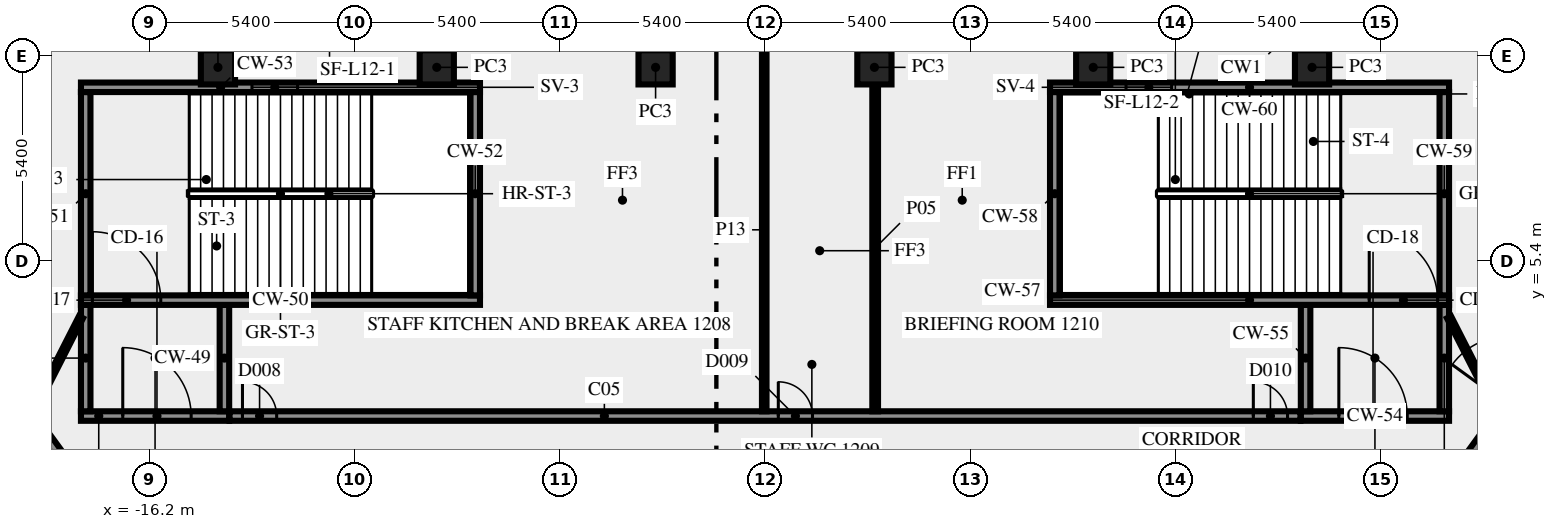
"""IFC4 building model, lengths in metres.
Left out: names, types, materials, properties, quantities, classifications, styles, units other than length and angle.
Written with IfcOpenShell. Run it as: python <this file> out.ifc"""

import sys

from ifc_helpers import new_model, si_unit, direction, frame, frame_2d, origin, origin_2d, place, context, subcontext, project, spatial, rectangle, extrude, element, fill, save


model = new_model("IFC4")
c1 = context("Model", 3, precision=1e-05, world=origin(), true_north=direction((0.0, 1.0)))
c2 = subcontext(c1, "Body", "Model", "MODEL_VIEW")
j1 = project(units=[si_unit("LENGTHUNIT", "METRE"), si_unit("PLANEANGLEUNIT", "RADIAN")], contexts=[c1])
p1 = place(None, origin())
s1 = spatial("IfcSite", under=j1, at=p1, CompositionType="ELEMENT")
p2 = place(p1, origin())
s2 = spatial("IfcBuilding", under=s1, at=p2, CompositionType="ELEMENT")
p3 = place(p2, frame((0.0, 0.0, 55.0)))
s3 = spatial("IfcBuildingStorey", under=s2, at=p3, CompositionType="ELEMENT", Elevation=55.0)
for number, where, z_axis, x_axis in (
    (1, (14.395, 10.5, 0.0), (0.0, 0.0, 1.0), (-1.0, 0.0, 0.0)),
    (2, (8.637, 10.5, 0.0), (0.0, 0.0, 1.0), (-1.0, 0.0, 0.0)),
    (3, (2.879, 10.5, 0.0), (0.0, 0.0, 1.0), (-1.0, 0.0, 0.0)),
    (4, (-2.879, 10.5, 0.0), (0.0, 0.0, 1.0), (-1.0, 0.0, 0.0)),
    (5, (-8.637, 10.5, 0.0), (0.0, 0.0, 1.0), (-1.0, 0.0, 0.0)),
    (6, (-14.395, 10.5, 0.0), (0.0, 0.0, 1.0), (-1.0, 0.0, 0.0)),
):
    element("IfcColumn", number, at=place(p3, frame(where, z_axis=z_axis, x_axis=x_axis)), inside=s3, PredefinedType="COLUMN", context=c2, shape_type="SweptSolid", body=[
        extrude(rectangle(XDim=0.9, YDim=0.9, at=origin_2d()), origin(), (0.0, 0.0, 1.0), 3.65),
    ])
p4 = place(p3, frame((-18.0, 1.325, 0.0), z_axis=(0.0, 0.0, 1.0), x_axis=(1.0, 0.0, 0.0)))
e7 = element("IfcWall", 7, at=p4, inside=s3, PredefinedType="SHEAR", context=c2, shape_type="SweptSolid", body=[
    extrude(rectangle(XDim=3.9, YDim=0.25, at=frame_2d((1.95, 0.0))), origin(), (0.0, 0.0, 1.0), 3.65),
])
p5 = place(p4, frame((1.1, 0.0, 0.0)))
e8 = element("IfcOpeningElement", 8, at=p5, cuts=e7, PredefinedType="OPENING", context=c2, shape_type="SweptSolid", body=[
    extrude(rectangle(XDim=1.8, YDim=2.1, at=frame_2d((0.9, 1.05))), frame((0.0, 0.135, 0.0), z_axis=(0.0, -1.0, 0.0), x_axis=(1.0, 0.0, 0.0)), (0.0, 0.0, 1.0), 0.27),
])
for number, where, z_axis, x_axis in (
    (9, (-17.875, 1.45, 0.0), (0.0, 0.0, 1.0), (0.0, 1.0, 0.0)),
    (10, (-14.225, 1.45, 0.0), (0.0, 0.0, 1.0), (0.0, 1.0, 0.0)),
):
    element("IfcWall", number, at=place(p3, frame(where, z_axis=z_axis, x_axis=x_axis)), inside=s3, PredefinedType="SHEAR", context=c2, shape_type="SweptSolid", body=[
        extrude(rectangle(XDim=2.8, YDim=0.25, at=frame_2d((1.4, 0.0))), origin(), (0.0, 0.0, 1.0), 3.65),
    ])
p6 = place(p3, frame((-18.0, 4.375, 0.0), z_axis=(0.0, 0.0, 1.0), x_axis=(1.0, 0.0, 0.0)))
e11 = element("IfcWall", 11, at=p6, inside=s3, PredefinedType="SHEAR", context=c2, shape_type="SweptSolid", body=[
    extrude(rectangle(XDim=10.5, YDim=0.25, at=frame_2d((5.25, 0.0))), origin(), (0.0, 0.0, 1.0), 3.65),
])
p7 = place(p6, frame((0.3, 0.0, 0.0)))
e12 = element("IfcOpeningElement", 12, at=p7, cuts=e11, PredefinedType="OPENING", context=c2, shape_type="SweptSolid", body=[
    extrude(rectangle(XDim=1.8, YDim=2.1, at=frame_2d((0.9, 1.05))), frame((0.0, 0.135, 0.0), z_axis=(0.0, -1.0, 0.0), x_axis=(1.0, 0.0, 0.0)), (0.0, 0.0, 1.0), 0.27),
])
for number, where, z_axis, x_axis in (
    (13, (-17.875, 4.5, 0.0), (0.0, 0.0, 1.0), (0.0, 1.0, 0.0)),
    (14, (-7.625, 4.5, 0.0), (0.0, 0.0, 1.0), (0.0, 1.0, 0.0)),
):
    element("IfcWall", number, at=place(p3, frame(where, z_axis=z_axis, x_axis=x_axis)), inside=s3, PredefinedType="SHEAR", context=c2, shape_type="SweptSolid", body=[
        extrude(rectangle(XDim=5.35, YDim=0.25, at=frame_2d((2.675, 0.0))), origin(), (0.0, 0.0, 1.0), 3.65),
    ])
p8 = place(p3, frame((-18.0, 9.975, 0.0), z_axis=(0.0, 0.0, 1.0), x_axis=(1.0, 0.0, 0.0)))
e15 = element("IfcWall", 15, at=p8, inside=s3, PredefinedType="SHEAR", context=c2, shape_type="SweptSolid", body=[
    extrude(rectangle(XDim=10.5, YDim=0.25, at=frame_2d((5.25, 0.0))), origin(), (0.0, 0.0, 1.0), 3.65),
])
p9 = place(p8, frame((4.5, 0.0, 1.0)))
e16 = element("IfcOpeningElement", 16, at=p9, cuts=e15, PredefinedType="OPENING", context=c2, shape_type="SweptSolid", body=[
    extrude(rectangle(XDim=1.2, YDim=1.2, at=frame_2d((0.6, 0.6))), frame((0.0, 0.135, 0.0), z_axis=(0.0, -1.0, 0.0), x_axis=(1.0, 0.0, 0.0)), (0.0, 0.0, 1.0), 0.27),
])
p10 = place(p3, frame((14.1, 1.325, 0.0), z_axis=(0.0, 0.0, 1.0), x_axis=(1.0, 0.0, 0.0)))
e17 = element("IfcWall", 17, at=p10, inside=s3, PredefinedType="SHEAR", context=c2, shape_type="SweptSolid", body=[
    extrude(rectangle(XDim=3.9, YDim=0.25, at=frame_2d((1.95, 0.0))), origin(), (0.0, 0.0, 1.0), 3.65),
])
p11 = place(p10, frame((1.0, 0.0, 0.0)))
e18 = element("IfcOpeningElement", 18, at=p11, cuts=e17, PredefinedType="OPENING", context=c2, shape_type="SweptSolid", body=[
    extrude(rectangle(XDim=1.8, YDim=2.1, at=frame_2d((0.9, 1.05))), frame((0.0, 0.135, 0.0), z_axis=(0.0, -1.0, 0.0), x_axis=(1.0, 0.0, 0.0)), (0.0, 0.0, 1.0), 0.27),
])
for number, where, z_axis, x_axis in (
    (19, (14.225, 1.45, 0.0), (0.0, 0.0, 1.0), (0.0, 1.0, 0.0)),
    (20, (17.875, 1.45, 0.0), (0.0, 0.0, 1.0), (0.0, 1.0, 0.0)),
):
    element("IfcWall", number, at=place(p3, frame(where, z_axis=z_axis, x_axis=x_axis)), inside=s3, PredefinedType="SHEAR", context=c2, shape_type="SweptSolid", body=[
        extrude(rectangle(XDim=2.8, YDim=0.25, at=frame_2d((1.4, 0.0))), origin(), (0.0, 0.0, 1.0), 3.65),
    ])
p12 = place(p3, frame((7.5, 4.375, 0.0), z_axis=(0.0, 0.0, 1.0), x_axis=(1.0, 0.0, 0.0)))
e21 = element("IfcWall", 21, at=p12, inside=s3, PredefinedType="SHEAR", context=c2, shape_type="SweptSolid", body=[
    extrude(rectangle(XDim=10.5, YDim=0.25, at=frame_2d((5.25, 0.0))), origin(), (0.0, 0.0, 1.0), 3.65),
])
p13 = place(p12, frame((8.4, 0.0, 0.0)))
e22 = element("IfcOpeningElement", 22, at=p13, cuts=e21, PredefinedType="OPENING", context=c2, shape_type="SweptSolid", body=[
    extrude(rectangle(XDim=1.8, YDim=2.1, at=frame_2d((0.9, 1.05))), frame((0.0, 0.135, 0.0), z_axis=(0.0, -1.0, 0.0), x_axis=(1.0, 0.0, 0.0)), (0.0, 0.0, 1.0), 0.27),
])
for number, where, z_axis, x_axis in (
    (23, (7.625, 4.5, 0.0), (0.0, 0.0, 1.0), (0.0, 1.0, 0.0)),
    (24, (17.875, 4.5, 0.0), (0.0, 0.0, 1.0), (0.0, 1.0, 0.0)),
):
    element("IfcWall", number, at=place(p3, frame(where, z_axis=z_axis, x_axis=x_axis)), inside=s3, PredefinedType="SHEAR", context=c2, shape_type="SweptSolid", body=[
        extrude(rectangle(XDim=5.35, YDim=0.25, at=frame_2d((2.675, 0.0))), origin(), (0.0, 0.0, 1.0), 3.65),
    ])
p14 = place(p3, frame((7.5, 9.975, 0.0), z_axis=(0.0, 0.0, 1.0), x_axis=(1.0, 0.0, 0.0)))
e25 = element("IfcWall", 25, at=p14, inside=s3, PredefinedType="SHEAR", context=c2, shape_type="SweptSolid", body=[
    extrude(rectangle(XDim=10.5, YDim=0.25, at=frame_2d((5.25, 0.0))), origin(), (0.0, 0.0, 1.0), 3.65),
])
p15 = place(p14, frame((2.0, 0.0, 1.0)))
e26 = element("IfcOpeningElement", 26, at=p15, cuts=e25, PredefinedType="OPENING", context=c2, shape_type="SweptSolid", body=[
    extrude(rectangle(XDim=1.2, YDim=1.2, at=frame_2d((0.6, 0.6))), frame((0.0, 0.135, 0.0), z_axis=(0.0, -1.0, 0.0), x_axis=(1.0, 0.0, 0.0)), (0.0, 0.0, 1.0), 0.27),
])
p16 = place(p3, frame((-37.232, 25.972, 0.0), z_axis=(0.0, 0.0, 1.0), x_axis=(0.587786323093, -0.809016216391, 0.0)))
e27 = element("IfcWall", 27, at=p16, inside=s3, PredefinedType="SOLIDWALL", context=c2, shape_type="SweptSolid", body=[
    extrude(rectangle(XDim=33.493, YDim=0.25, at=frame_2d((16.747, 0.0))), origin(), (0.0, 0.0, 1.0), 3.65),
])
p17 = place(p16, frame((28.301, 0.0, 0.0)))
e28 = element("IfcOpeningElement", 28, at=p17, cuts=e27, PredefinedType="OPENING", context=c2, shape_type="SweptSolid", body=[
    extrude(rectangle(XDim=1.8, YDim=2.1, at=frame_2d((0.9, 1.05))), frame((0.0, 0.135, 0.0), z_axis=(0.0, -1.0, 0.0), x_axis=(1.0, 0.0, 0.0)), (0.0, 0.0, 1.0), 0.27),
])
p18 = place(p16, frame((4.235, 0.0, 0.0)))
e29 = element("IfcOpeningElement", 29, at=p18, cuts=e27, PredefinedType="OPENING", context=c2, shape_type="SweptSolid", body=[
    extrude(rectangle(XDim=1.8, YDim=2.1, at=frame_2d((0.9, 1.05))), frame((0.0, 0.135, 0.0), z_axis=(0.0, -1.0, 0.0), x_axis=(1.0, 0.0, 0.0)), (0.0, 0.0, 1.0), 0.27),
])
p19 = place(p16, frame((2.685, 0.0, 0.0)))
e30 = element("IfcOpeningElement", 30, at=p19, cuts=e27, PredefinedType="OPENING", context=c2, shape_type="SweptSolid", body=[
    extrude(rectangle(XDim=0.9, YDim=2.1, at=frame_2d((0.45, 1.05))), frame((0.0, 0.135, 0.0), z_axis=(0.0, -1.0, 0.0), x_axis=(1.0, 0.0, 0.0)), (0.0, 0.0, 1.0), 0.27),
])
p20 = place(p3, frame((-14.09, 1.325, 0.0), z_axis=(0.0, 0.0, 1.0), x_axis=(1.0, 0.0, 0.0)))
e31 = element("IfcWall", 31, at=p20, inside=s3, PredefinedType="SOLIDWALL", context=c2, shape_type="SweptSolid", body=[
    extrude(rectangle(XDim=28.18, YDim=0.25, at=frame_2d((14.09, 0.0))), origin(), (0.0, 0.0, 1.0), 3.65),
])
p21 = place(p20, frame((26.94, 0.0, 0.0)))
e32 = element("IfcOpeningElement", 32, at=p21, cuts=e31, PredefinedType="OPENING", context=c2, shape_type="SweptSolid", body=[
    extrude(rectangle(XDim=0.9, YDim=2.1, at=frame_2d((0.45, 1.05))), frame((0.0, 0.135, 0.0), z_axis=(0.0, -1.0, 0.0), x_axis=(1.0, 0.0, 0.0)), (0.0, 0.0, 1.0), 0.27),
])
p22 = place(p20, frame((0.34, 0.0, 0.0)))
e33 = element("IfcOpeningElement", 33, at=p22, cuts=e31, PredefinedType="OPENING", context=c2, shape_type="SweptSolid", body=[
    extrude(rectangle(XDim=0.9, YDim=2.1, at=frame_2d((0.45, 1.05))), frame((0.0, 0.135, 0.0), z_axis=(0.0, -1.0, 0.0), x_axis=(1.0, 0.0, 0.0)), (0.0, 0.0, 1.0), 0.27),
])
p23 = place(p20, frame((14.44, 0.0, 0.0)))
e34 = element("IfcOpeningElement", 34, at=p23, cuts=e31, PredefinedType="OPENING", context=c2, shape_type="SweptSolid", body=[
    extrude(rectangle(XDim=0.9, YDim=2.1, at=frame_2d((0.45, 1.05))), frame((0.0, 0.135, 0.0), z_axis=(0.0, -1.0, 0.0), x_axis=(1.0, 0.0, 0.0)), (0.0, 0.0, 1.0), 0.27),
])
p24 = place(p3, frame((17.545, -1.125, 0.0), z_axis=(0.0, 0.0, 1.0), x_axis=(0.587786323093, 0.809016216391, 0.0)))
e35 = element("IfcWall", 35, at=p24, inside=s3, PredefinedType="SOLIDWALL", context=c2, shape_type="SweptSolid", body=[
    extrude(rectangle(XDim=33.493, YDim=0.25, at=frame_2d((16.747, 0.0))), origin(), (0.0, 0.0, 1.0), 3.65),
])
p25 = place(p24, frame((31.403, 0.0, 0.0)))
e36 = element("IfcOpeningElement", 36, at=p25, cuts=e35, PredefinedType="OPENING", context=c2, shape_type="SweptSolid", body=[
    extrude(rectangle(XDim=1.8, YDim=2.1, at=frame_2d((0.9, 1.05))), frame((0.0, 0.135, 0.0), z_axis=(0.0, -1.0, 0.0), x_axis=(1.0, 0.0, 0.0)), (0.0, 0.0, 1.0), 0.27),
])
p26 = place(p24, frame((3.392, 0.0, 0.0)))
e37 = element("IfcOpeningElement", 37, at=p26, cuts=e35, PredefinedType="OPENING", context=c2, shape_type="SweptSolid", body=[
    extrude(rectangle(XDim=1.8, YDim=2.1, at=frame_2d((0.9, 1.05))), frame((0.0, 0.135, 0.0), z_axis=(0.0, -1.0, 0.0), x_axis=(1.0, 0.0, 0.0)), (0.0, 0.0, 1.0), 0.27),
])
p27 = place(p3, frame((2.899, 10.045, 0.0), z_axis=(0.0, 0.0, 1.0), x_axis=(0.0, -1.0, 0.0)))
e38 = element("IfcWall", 38, at=p27, inside=s3, PredefinedType="PARTITIONING", context=c2, shape_type="SweptSolid", body=[
    extrude(rectangle(XDim=8.595, YDim=0.15, at=frame_2d((4.297, 0.0))), origin(), (0.0, 0.0, 1.0), 3.65),
])
p28 = place(p3, frame((-0.02, 1.45, 0.0), z_axis=(0.0, 0.0, 1.0), x_axis=(0.0, 1.0, 0.0)))
e39 = element("IfcWall", 39, at=p28, inside=s3, PredefinedType="PARTITIONING", context=c2, shape_type="SweptSolid", body=[
    extrude(rectangle(XDim=9.55, YDim=0.12, at=frame_2d((4.775, 0.0))), origin(), (0.0, 0.0, 1.0), 2.75),
])
for number, where, z_axis, x_axis in (
    (40, (18.0, 3.925, 0.0), (0.0, 0.0, 1.0), (0.454, -0.891, 0.0)),
    (41, (-19.261, 1.45, 0.0), (0.0, 0.0, 1.0), (0.454, 0.891, 0.0)),
):
    element("IfcWall", number, at=place(p3, frame(where, z_axis=z_axis, x_axis=x_axis)), inside=s3, PredefinedType="PARTITIONING", context=c2, shape_type="SweptSolid", body=[
        extrude(rectangle(XDim=2.778, YDim=0.12, at=frame_2d((1.389, 0.0))), origin(), (0.0, 0.0, 1.0), 3.65),
    ])
p29 = place(p5, origin())
e42 = element("IfcDoor", 42, at=p29, inside=s3, OperationType="DOUBLE_DOOR_SINGLE_SWING", PredefinedType="DOOR", context=c2, shape_type="SweptSolid", body=[
    extrude(rectangle(XDim=1.8, YDim=2.1, at=frame_2d((0.9, 1.05))), frame((0.0, 0.025, 0.0), z_axis=(0.0, -1.0, 0.0), x_axis=(1.0, 0.0, 0.0)), (0.0, 0.0, 1.0), 0.05),
])
fill(e8, e42)
p30 = place(p7, origin())
e43 = element("IfcDoor", 43, at=p30, inside=s3, OperationType="DOUBLE_DOOR_SINGLE_SWING", PredefinedType="DOOR", context=c2, shape_type="SweptSolid", body=[
    extrude(rectangle(XDim=1.8, YDim=2.1, at=frame_2d((0.9, 1.05))), frame((0.0, 0.025, 0.0), z_axis=(0.0, -1.0, 0.0), x_axis=(1.0, 0.0, 0.0)), (0.0, 0.0, 1.0), 0.05),
])
fill(e12, e43)
p31 = place(p9, origin())
e44 = element("IfcWindow", 44, at=p31, inside=s3, PartitioningType="SINGLE_PANEL", PredefinedType="WINDOW", context=c2, shape_type="SweptSolid", body=[
    extrude(rectangle(XDim=1.2, YDim=1.2, at=frame_2d((0.6, 0.6))), frame((0.0, 0.03, 0.0), z_axis=(0.0, -1.0, 0.0), x_axis=(1.0, 0.0, 0.0)), (0.0, 0.0, 1.0), 0.06),
])
fill(e16, e44)
p32 = place(p11, origin())
e45 = element("IfcDoor", 45, at=p32, inside=s3, OperationType="DOUBLE_DOOR_SINGLE_SWING", PredefinedType="DOOR", context=c2, shape_type="SweptSolid", body=[
    extrude(rectangle(XDim=1.8, YDim=2.1, at=frame_2d((0.9, 1.05))), frame((0.0, 0.025, 0.0), z_axis=(0.0, -1.0, 0.0), x_axis=(1.0, 0.0, 0.0)), (0.0, 0.0, 1.0), 0.05),
])
fill(e18, e45)
p33 = place(p13, origin())
e46 = element("IfcDoor", 46, at=p33, inside=s3, OperationType="DOUBLE_DOOR_SINGLE_SWING", PredefinedType="DOOR", context=c2, shape_type="SweptSolid", body=[
    extrude(rectangle(XDim=1.8, YDim=2.1, at=frame_2d((0.9, 1.05))), frame((0.0, 0.025, 0.0), z_axis=(0.0, -1.0, 0.0), x_axis=(1.0, 0.0, 0.0)), (0.0, 0.0, 1.0), 0.05),
])
fill(e22, e46)
p34 = place(p15, origin())
e47 = element("IfcWindow", 47, at=p34, inside=s3, PartitioningType="SINGLE_PANEL", PredefinedType="WINDOW", context=c2, shape_type="SweptSolid", body=[
    extrude(rectangle(XDim=1.2, YDim=1.2, at=frame_2d((0.6, 0.6))), frame((0.0, 0.03, 0.0), z_axis=(0.0, -1.0, 0.0), x_axis=(1.0, 0.0, 0.0)), (0.0, 0.0, 1.0), 0.06),
])
fill(e26, e47)
p35 = place(p21, origin())
e48 = element("IfcDoor", 48, at=p35, inside=s3, OperationType="SINGLE_SWING_RIGHT", PredefinedType="DOOR", context=c2, shape_type="SweptSolid", body=[
    extrude(rectangle(XDim=0.9, YDim=2.1, at=frame_2d((0.45, 1.05))), frame((0.0, 0.025, 0.0), z_axis=(0.0, -1.0, 0.0), x_axis=(1.0, 0.0, 0.0)), (0.0, 0.0, 1.0), 0.05),
])
fill(e32, e48)
p36 = place(p22, origin())
e49 = element("IfcDoor", 49, at=p36, inside=s3, OperationType="SINGLE_SWING_LEFT", PredefinedType="DOOR", context=c2, shape_type="SweptSolid", body=[
    extrude(rectangle(XDim=0.9, YDim=2.1, at=frame_2d((0.45, 1.05))), frame((0.0, 0.025, 0.0), z_axis=(0.0, -1.0, 0.0), x_axis=(1.0, 0.0, 0.0)), (0.0, 0.0, 1.0), 0.05),
])
fill(e33, e49)
p37 = place(p23, origin())
e50 = element("IfcDoor", 50, at=p37, inside=s3, OperationType="SINGLE_SWING_LEFT", PredefinedType="DOOR", context=c2, shape_type="SweptSolid", body=[
    extrude(rectangle(XDim=0.9, YDim=2.1, at=frame_2d((0.45, 1.05))), frame((0.0, 0.025, 0.0), z_axis=(0.0, -1.0, 0.0), x_axis=(1.0, 0.0, 0.0)), (0.0, 0.0, 1.0), 0.05),
])
fill(e34, e50)
save(model, sys.argv[1])
